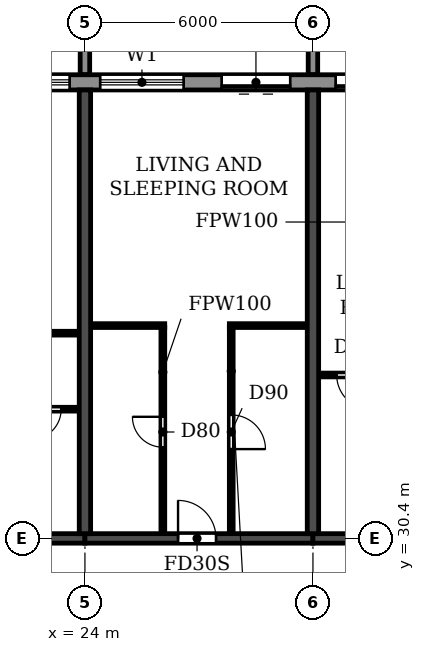
"""IFC4 building model, lengths in metres.
Left out: names, types, materials, properties, quantities, classifications, styles, units other than length and angle.
Written with IfcOpenShell. Run it as: python <this file> out.ifc"""

import sys

from ifc_helpers import new_model, si_unit, direction, frame, frame_2d, origin, place, context, subcontext, project, spatial, polyline, rectangle, outline, extrude, source, transform, mapped, element, fill, save


model = new_model("IFC4")
c1 = context("Model", 3, precision=1e-05, world=origin(), true_north=direction((0.0, 1.0)))
c2 = subcontext(c1, "Body", "Model", "MODEL_VIEW")
j1 = project(units=[si_unit("LENGTHUNIT", "METRE"), si_unit("PLANEANGLEUNIT", "RADIAN")], contexts=[c1])
p1 = place(None, origin())
s1 = spatial("IfcSite", under=j1, at=p1, CompositionType="ELEMENT")
p2 = place(p1, origin())
s2 = spatial("IfcBuilding", under=s1, at=p2, CompositionType="ELEMENT")
p3 = place(p2, frame((0.0, 0.0, 155.4)))
s3 = spatial("IfcBuildingStorey", under=s2, at=p3, CompositionType="ELEMENT", Elevation=155.4)
for number, where, z_axis, x_axis in (
    (1, (24.0, 30.525, 0.0), (0.0, 0.0, 1.0), (0.0, 1.0, 0.0)),
    (2, (30.0, 30.525, 0.0), (0.0, 0.0, 1.0), (0.0, 1.0, 0.0)),
):
    element("IfcWall", number, at=place(p3, frame(where, z_axis=z_axis, x_axis=x_axis)), inside=s3, PredefinedType="SHEAR", context=c2, shape_type="SweptSolid", body=[
        extrude(rectangle(XDim=11.675, YDim=0.3, at=frame_2d((5.837, 0.0))), origin(), (0.0, 0.0, 1.0), 3.0),
    ])
p4 = place(p3, frame((18.0, 30.4, 0.0), z_axis=(0.0, 0.0, 1.0), x_axis=(1.0, 0.0, 0.0)))
e3 = element("IfcWall", 3, at=p4, inside=s3, PredefinedType="SHEAR", context=c2, shape_type="SweptSolid", body=[
    extrude(rectangle(XDim=6.0, YDim=0.25, at=frame_2d((3.0, 0.0))), origin(), (0.0, 0.0, 1.0), 2.4),
])
p5 = place(p4, frame((2.55, 0.0, 0.0)))
e4 = element("IfcOpeningElement", 4, at=p5, cuts=e3, PredefinedType="OPENING", context=c2, shape_type="SweptSolid", body=[
    extrude(rectangle(XDim=1.0, YDim=2.1, at=frame_2d((0.5, 1.05))), frame((0.0, 0.135, 0.0), z_axis=(0.0, -1.0, 0.0), x_axis=(1.0, 0.0, 0.0)), (0.0, 0.0, 1.0), 0.27),
])
p6 = place(p3, frame((24.0, 30.4, 0.0), z_axis=(0.0, 0.0, 1.0), x_axis=(1.0, 0.0, 0.0)))
e5 = element("IfcWall", 5, at=p6, inside=s3, PredefinedType="SHEAR", context=c2, shape_type="SweptSolid", body=[
    extrude(rectangle(XDim=6.0, YDim=0.25, at=frame_2d((3.0, 0.0))), origin(), (0.0, 0.0, 1.0), 2.4),
])
p7 = place(p6, frame((2.45, 0.0, 0.0)))
e6 = element("IfcOpeningElement", 6, at=p7, cuts=e5, PredefinedType="OPENING", context=c2, shape_type="SweptSolid", body=[
    extrude(rectangle(XDim=1.0, YDim=2.1, at=frame_2d((0.5, 1.05))), frame((0.0, 0.135, 0.0), z_axis=(0.0, -1.0, 0.0), x_axis=(1.0, 0.0, 0.0)), (0.0, 0.0, 1.0), 0.27),
])
p8 = place(p3, frame((30.0, 30.4, 0.0), z_axis=(0.0, 0.0, 1.0), x_axis=(1.0, 0.0, 0.0)))
e7 = element("IfcWall", 7, at=p8, inside=s3, PredefinedType="SHEAR", context=c2, shape_type="SweptSolid", body=[
    extrude(rectangle(XDim=6.0, YDim=0.25, at=frame_2d((3.0, 0.0))), origin(), (0.0, 0.0, 1.0), 2.4),
])
p9 = place(p8, frame((2.55, 0.0, 0.0)))
e8 = element("IfcOpeningElement", 8, at=p9, cuts=e7, PredefinedType="OPENING", context=c2, shape_type="SweptSolid", body=[
    extrude(rectangle(XDim=1.0, YDim=2.1, at=frame_2d((0.5, 1.05))), frame((0.0, 0.135, 0.0), z_axis=(0.0, -1.0, 0.0), x_axis=(1.0, 0.0, 0.0)), (0.0, 0.0, 1.0), 0.27),
])
p10 = place(p3, frame((85.317, 42.4, 0.0), z_axis=(0.0, 0.0, 1.0), x_axis=(-1.0, 0.0, 0.0)))
e9 = element("IfcWall", 9, at=p10, inside=s3, PredefinedType="STANDARD", context=c2, shape_type="SweptSolid", body=[
    extrude(rectangle(XDim=68.634, YDim=0.4, at=frame_2d((34.317, 0.0))), origin(), (0.0, 0.0, 1.0), 3.0),
])
p11 = place(p10, frame((64.917, 0.0, 0.0)))
e10 = element("IfcOpeningElement", 10, at=p11, cuts=e9, PredefinedType="OPENING", context=c2, shape_type="SweptSolid", body=[
    extrude(rectangle(XDim=1.8, YDim=2.4, at=frame_2d((0.9, 1.2))), frame((0.0, 0.21, 0.0), z_axis=(0.0, -1.0, 0.0), x_axis=(1.0, 0.0, 0.0)), (0.0, 0.0, 1.0), 0.42),
])
p12 = place(p10, frame((61.717, 0.0, 0.9)))
e11 = element("IfcOpeningElement", 11, at=p12, cuts=e9, PredefinedType="OPENING", context=c2, shape_type="SweptSolid", body=[
    extrude(rectangle(XDim=2.2, YDim=1.5, at=frame_2d((1.1, 0.75))), frame((0.0, 0.21, 0.0), z_axis=(0.0, -1.0, 0.0), x_axis=(1.0, 0.0, 0.0)), (0.0, 0.0, 1.0), 0.42),
])
p13 = place(p10, frame((58.717, 0.0, 0.9)))
e12 = element("IfcOpeningElement", 12, at=p13, cuts=e9, PredefinedType="OPENING", context=c2, shape_type="SweptSolid", body=[
    extrude(rectangle(XDim=2.2, YDim=1.5, at=frame_2d((1.1, 0.75))), frame((0.0, 0.21, 0.0), z_axis=(0.0, -1.0, 0.0), x_axis=(1.0, 0.0, 0.0)), (0.0, 0.0, 1.0), 0.42),
])
p14 = place(p10, frame((55.917, 0.0, 0.0)))
e13 = element("IfcOpeningElement", 13, at=p14, cuts=e9, PredefinedType="OPENING", context=c2, shape_type="SweptSolid", body=[
    extrude(rectangle(XDim=1.8, YDim=2.4, at=frame_2d((0.9, 1.2))), frame((0.0, 0.21, 0.0), z_axis=(0.0, -1.0, 0.0), x_axis=(1.0, 0.0, 0.0)), (0.0, 0.0, 1.0), 0.42),
])
p15 = place(p10, frame((52.917, 0.0, 0.0)))
e14 = element("IfcOpeningElement", 14, at=p15, cuts=e9, PredefinedType="OPENING", context=c2, shape_type="SweptSolid", body=[
    extrude(rectangle(XDim=1.8, YDim=2.4, at=frame_2d((0.9, 1.2))), frame((0.0, 0.21, 0.0), z_axis=(0.0, -1.0, 0.0), x_axis=(1.0, 0.0, 0.0)), (0.0, 0.0, 1.0), 0.42),
])
p16 = place(p10, frame((49.717, 0.0, 0.9)))
e15 = element("IfcOpeningElement", 15, at=p16, cuts=e9, PredefinedType="OPENING", context=c2, shape_type="SweptSolid", body=[
    extrude(rectangle(XDim=2.2, YDim=1.5, at=frame_2d((1.1, 0.75))), frame((0.0, 0.21, 0.0), z_axis=(0.0, -1.0, 0.0), x_axis=(1.0, 0.0, 0.0)), (0.0, 0.0, 1.0), 0.42),
])
p17 = place(p10, frame((46.717, 0.0, 0.9)))
e16 = element("IfcOpeningElement", 16, at=p17, cuts=e9, PredefinedType="OPENING", context=c2, shape_type="SweptSolid", body=[
    extrude(rectangle(XDim=2.2, YDim=1.5, at=frame_2d((1.1, 0.75))), frame((0.0, 0.21, 0.0), z_axis=(0.0, -1.0, 0.0), x_axis=(1.0, 0.0, 0.0)), (0.0, 0.0, 1.0), 0.42),
])
p18 = place(p10, frame((43.717, 0.0, 0.9)))
e17 = element("IfcOpeningElement", 17, at=p18, cuts=e9, PredefinedType="OPENING", context=c2, shape_type="SweptSolid", body=[
    extrude(rectangle(XDim=2.2, YDim=1.5, at=frame_2d((1.1, 0.75))), frame((0.0, 0.21, 0.0), z_axis=(0.0, -1.0, 0.0), x_axis=(1.0, 0.0, 0.0)), (0.0, 0.0, 1.0), 0.42),
])
p19 = place(p10, frame((40.917, 0.0, 0.0)))
e18 = element("IfcOpeningElement", 18, at=p19, cuts=e9, PredefinedType="OPENING", context=c2, shape_type="SweptSolid", body=[
    extrude(rectangle(XDim=1.8, YDim=2.4, at=frame_2d((0.9, 1.2))), frame((0.0, 0.21, 0.0), z_axis=(0.0, -1.0, 0.0), x_axis=(1.0, 0.0, 0.0)), (0.0, 0.0, 1.0), 0.42),
])
p20 = place(p10, frame((37.717, 0.0, 0.9)))
e19 = element("IfcOpeningElement", 19, at=p20, cuts=e9, PredefinedType="OPENING", context=c2, shape_type="SweptSolid", body=[
    extrude(rectangle(XDim=2.2, YDim=1.5, at=frame_2d((1.1, 0.75))), frame((0.0, 0.21, 0.0), z_axis=(0.0, -1.0, 0.0), x_axis=(1.0, 0.0, 0.0)), (0.0, 0.0, 1.0), 0.42),
])
p21 = place(p10, frame((34.917, 0.0, 0.0)))
e20 = element("IfcOpeningElement", 20, at=p21, cuts=e9, PredefinedType="OPENING", context=c2, shape_type="SweptSolid", body=[
    extrude(rectangle(XDim=1.8, YDim=2.4, at=frame_2d((0.9, 1.2))), frame((0.0, 0.21, 0.0), z_axis=(0.0, -1.0, 0.0), x_axis=(1.0, 0.0, 0.0)), (0.0, 0.0, 1.0), 0.42),
])
p22 = place(p10, frame((31.717, 0.0, 0.9)))
e21 = element("IfcOpeningElement", 21, at=p22, cuts=e9, PredefinedType="OPENING", context=c2, shape_type="SweptSolid", body=[
    extrude(rectangle(XDim=2.2, YDim=1.5, at=frame_2d((1.1, 0.75))), frame((0.0, 0.21, 0.0), z_axis=(0.0, -1.0, 0.0), x_axis=(1.0, 0.0, 0.0)), (0.0, 0.0, 1.0), 0.42),
])
p23 = place(p10, frame((28.717, 0.0, 0.9)))
e22 = element("IfcOpeningElement", 22, at=p23, cuts=e9, PredefinedType="OPENING", context=c2, shape_type="SweptSolid", body=[
    extrude(rectangle(XDim=2.2, YDim=1.5, at=frame_2d((1.1, 0.75))), frame((0.0, 0.21, 0.0), z_axis=(0.0, -1.0, 0.0), x_axis=(1.0, 0.0, 0.0)), (0.0, 0.0, 1.0), 0.42),
])
p24 = place(p10, frame((25.717, 0.0, 0.9)))
e23 = element("IfcOpeningElement", 23, at=p24, cuts=e9, PredefinedType="OPENING", context=c2, shape_type="SweptSolid", body=[
    extrude(rectangle(XDim=2.2, YDim=1.5, at=frame_2d((1.1, 0.75))), frame((0.0, 0.21, 0.0), z_axis=(0.0, -1.0, 0.0), x_axis=(1.0, 0.0, 0.0)), (0.0, 0.0, 1.0), 0.42),
])
p25 = place(p10, frame((22.717, 0.0, 0.9)))
e24 = element("IfcOpeningElement", 24, at=p25, cuts=e9, PredefinedType="OPENING", context=c2, shape_type="SweptSolid", body=[
    extrude(rectangle(XDim=2.2, YDim=1.5, at=frame_2d((1.1, 0.75))), frame((0.0, 0.21, 0.0), z_axis=(0.0, -1.0, 0.0), x_axis=(1.0, 0.0, 0.0)), (0.0, 0.0, 1.0), 0.42),
])
p26 = place(p10, frame((19.917, 0.0, 0.0)))
e25 = element("IfcOpeningElement", 25, at=p26, cuts=e9, PredefinedType="OPENING", context=c2, shape_type="SweptSolid", body=[
    extrude(rectangle(XDim=1.8, YDim=2.4, at=frame_2d((0.9, 1.2))), frame((0.0, 0.21, 0.0), z_axis=(0.0, -1.0, 0.0), x_axis=(1.0, 0.0, 0.0)), (0.0, 0.0, 1.0), 0.42),
])
p27 = place(p10, frame((16.717, 0.0, 0.9)))
e26 = element("IfcOpeningElement", 26, at=p27, cuts=e9, PredefinedType="OPENING", context=c2, shape_type="SweptSolid", body=[
    extrude(rectangle(XDim=2.2, YDim=1.5, at=frame_2d((1.1, 0.75))), frame((0.0, 0.21, 0.0), z_axis=(0.0, -1.0, 0.0), x_axis=(1.0, 0.0, 0.0)), (0.0, 0.0, 1.0), 0.42),
])
p28 = place(p10, frame((13.717, 0.0, 0.9)))
e27 = element("IfcOpeningElement", 27, at=p28, cuts=e9, PredefinedType="OPENING", context=c2, shape_type="SweptSolid", body=[
    extrude(rectangle(XDim=2.2, YDim=1.5, at=frame_2d((1.1, 0.75))), frame((0.0, 0.21, 0.0), z_axis=(0.0, -1.0, 0.0), x_axis=(1.0, 0.0, 0.0)), (0.0, 0.0, 1.0), 0.42),
])
p29 = place(p10, frame((10.917, 0.0, 0.0)))
e28 = element("IfcOpeningElement", 28, at=p29, cuts=e9, PredefinedType="OPENING", context=c2, shape_type="SweptSolid", body=[
    extrude(rectangle(XDim=1.8, YDim=2.4, at=frame_2d((0.9, 1.2))), frame((0.0, 0.21, 0.0), z_axis=(0.0, -1.0, 0.0), x_axis=(1.0, 0.0, 0.0)), (0.0, 0.0, 1.0), 0.42),
])
p30 = place(p10, frame((7.717, 0.0, 0.9)))
e29 = element("IfcOpeningElement", 29, at=p30, cuts=e9, PredefinedType="OPENING", context=c2, shape_type="SweptSolid", body=[
    extrude(rectangle(XDim=2.2, YDim=1.5, at=frame_2d((1.1, 0.75))), frame((0.0, 0.21, 0.0), z_axis=(0.0, -1.0, 0.0), x_axis=(1.0, 0.0, 0.0)), (0.0, 0.0, 1.0), 0.42),
])
p31 = place(p10, frame((4.717, 0.0, 0.9)))
e30 = element("IfcOpeningElement", 30, at=p31, cuts=e9, PredefinedType="OPENING", context=c2, shape_type="SweptSolid", body=[
    extrude(rectangle(XDim=2.2, YDim=1.5, at=frame_2d((1.1, 0.75))), frame((0.0, 0.21, 0.0), z_axis=(0.0, -1.0, 0.0), x_axis=(1.0, 0.0, 0.0)), (0.0, 0.0, 1.0), 0.42),
])
p32 = place(p10, frame((1.917, 0.0, 0.0)))
e31 = element("IfcOpeningElement", 31, at=p32, cuts=e9, PredefinedType="OPENING", context=c2, shape_type="SweptSolid", body=[
    extrude(rectangle(XDim=1.8, YDim=2.4, at=frame_2d((0.9, 1.2))), frame((0.0, 0.21, 0.0), z_axis=(0.0, -1.0, 0.0), x_axis=(1.0, 0.0, 0.0)), (0.0, 0.0, 1.0), 0.42),
])
m1 = source(origin(), c2, "Body", "SweptSolid", [
    extrude(outline(polyline([(0.0, 0.0), (0.25, 0.0), (0.25, 3.1), (0.0, 3.1), (0.0, 0.0)])), origin(), (0.0, 0.0, 1.0), 3.1),
])
for number, where in (
    (32, (23.875, 42.6, 0.0)),
    (33, (29.875, 42.6, 0.0)),
):
    element("IfcWall", number, at=place(p3, frame(where)), inside=s3, PredefinedType="STANDARD", context=c2, shape_type="MappedRepresentation", body=[
        mapped(m1, transform((0.0, 0.0, 0.0))),
    ])
p33 = place(p3, frame((21.9, 33.8, 0.0), z_axis=(0.0, 0.0, 1.0), x_axis=(1.0, 0.0, 0.0)))
e34 = element("IfcWall", 34, at=p33, inside=s3, PredefinedType="PARTITIONING", context=c2, shape_type="SweptSolid", body=[
    extrude(rectangle(XDim=1.94, YDim=0.1, at=frame_2d((0.97, 0.0))), origin(), (0.0, 0.0, 1.0), 3.0),
])
p34 = place(p33, frame((0.675, 0.0, 0.0)))
e35 = element("IfcOpeningElement", 35, at=p34, cuts=e34, PredefinedType="OPENING", context=c2, shape_type="SweptSolid", body=[
    extrude(rectangle(XDim=0.8, YDim=2.1, at=frame_2d((0.4, 1.05))), frame((0.0, 0.06, 0.0), z_axis=(0.0, -1.0, 0.0), x_axis=(1.0, 0.0, 0.0)), (0.0, 0.0, 1.0), 0.12),
])
p35 = place(p3, frame((30.16, 34.7, 0.0), z_axis=(0.0, 0.0, 1.0), x_axis=(1.0, 0.0, 0.0)))
e36 = element("IfcWall", 36, at=p35, inside=s3, PredefinedType="PARTITIONING", context=c2, shape_type="SweptSolid", body=[
    extrude(rectangle(XDim=2.04, YDim=0.1, at=frame_2d((1.02, 0.0))), origin(), (0.0, 0.0, 1.0), 3.0),
])
p36 = place(p35, frame((0.465, 0.0, 0.0)))
e37 = element("IfcOpeningElement", 37, at=p36, cuts=e36, PredefinedType="OPENING", context=c2, shape_type="SweptSolid", body=[
    extrude(rectangle(XDim=0.9, YDim=2.1, at=frame_2d((0.45, 1.05))), frame((0.0, 0.06, 0.0), z_axis=(0.0, -1.0, 0.0), x_axis=(1.0, 0.0, 0.0)), (0.0, 0.0, 1.0), 0.12),
])
p37 = place(p3, frame((20.95, 35.8, 0.0), z_axis=(0.0, 0.0, 1.0), x_axis=(1.0, 0.0, 0.0)))
e38 = element("IfcWall", 38, at=p37, inside=s3, PredefinedType="PARTITIONING", context=c2, shape_type="SweptSolid", body=[
    extrude(rectangle(XDim=2.89, YDim=0.1, at=frame_2d((1.445, 0.0))), origin(), (0.0, 0.0, 1.0), 3.0),
])
p38 = place(p37, frame((0.55, 0.0, 0.0)))
e39 = element("IfcOpeningElement", 39, at=p38, cuts=e38, PredefinedType="OPENING", context=c2, shape_type="SweptSolid", body=[
    extrude(rectangle(XDim=0.9, YDim=2.1, at=frame_2d((0.45, 1.05))), frame((0.0, 0.06, 0.0), z_axis=(0.0, -1.0, 0.0), x_axis=(1.0, 0.0, 0.0)), (0.0, 0.0, 1.0), 0.12),
])
p39 = place(p3, frame((24.16, 36.0, 0.0), z_axis=(0.0, 0.0, 1.0), x_axis=(1.0, 0.0, 0.0)))
e40 = element("IfcWall", 40, at=p39, inside=s3, PredefinedType="PARTITIONING", context=c2, shape_type="SweptSolid", body=[
    extrude(rectangle(XDim=1.94, YDim=0.1, at=frame_2d((0.97, 0.0))), origin(), (0.0, 0.0, 1.0), 3.0),
])
p40 = place(p3, frame((27.8, 36.0, 0.0), z_axis=(0.0, 0.0, 1.0), x_axis=(1.0, 0.0, 0.0)))
e41 = element("IfcWall", 41, at=p40, inside=s3, PredefinedType="PARTITIONING", context=c2, shape_type="SweptSolid", body=[
    extrude(rectangle(XDim=2.04, YDim=0.1, at=frame_2d((1.02, 0.0))), origin(), (0.0, 0.0, 1.0), 3.0),
])
p41 = place(p3, frame((26.05, 30.535, 0.0), z_axis=(0.0, 0.0, 1.0), x_axis=(0.0, 1.0, 0.0)))
e42 = element("IfcWall", 42, at=p41, inside=s3, PredefinedType="PARTITIONING", context=c2, shape_type="SweptSolid", body=[
    extrude(rectangle(XDim=5.415, YDim=0.1, at=frame_2d((2.708, 0.0))), origin(), (0.0, 0.0, 1.0), 3.0),
])
p42 = place(p41, frame((2.265, 0.0, 0.0)))
e43 = element("IfcOpeningElement", 43, at=p42, cuts=e42, PredefinedType="OPENING", context=c2, shape_type="SweptSolid", body=[
    extrude(rectangle(XDim=0.8, YDim=2.1, at=frame_2d((0.4, 1.05))), frame((0.0, 0.06, 0.0), z_axis=(0.0, -1.0, 0.0), x_axis=(1.0, 0.0, 0.0)), (0.0, 0.0, 1.0), 0.12),
])
p43 = place(p3, frame((27.85, 30.535, 0.0), z_axis=(0.0, 0.0, 1.0), x_axis=(0.0, 1.0, 0.0)))
e44 = element("IfcWall", 44, at=p43, inside=s3, PredefinedType="PARTITIONING", context=c2, shape_type="SweptSolid", body=[
    extrude(rectangle(XDim=5.415, YDim=0.1, at=frame_2d((2.708, 0.0))), origin(), (0.0, 0.0, 1.0), 3.0),
])
p44 = place(p43, frame((2.215, 0.0, 0.0)))
e45 = element("IfcOpeningElement", 45, at=p44, cuts=e44, PredefinedType="OPENING", context=c2, shape_type="SweptSolid", body=[
    extrude(rectangle(XDim=0.9, YDim=2.1, at=frame_2d((0.45, 1.05))), frame((0.0, 0.06, 0.0), z_axis=(0.0, -1.0, 0.0), x_axis=(1.0, 0.0, 0.0)), (0.0, 0.0, 1.0), 0.12),
])
p45 = place(p12, origin())
e46 = element("IfcWindow", 46, at=p45, inside=s3, PartitioningType="DOUBLE_PANEL_HORIZONTAL", PredefinedType="WINDOW", context=c2, shape_type="SweptSolid", body=[
    extrude(rectangle(XDim=2.2, YDim=1.5, at=frame_2d((1.1, 0.75))), frame((0.0, 0.03, 0.0), z_axis=(0.0, -1.0, 0.0), x_axis=(1.0, 0.0, 0.0)), (0.0, 0.0, 1.0), 0.06),
])
fill(e11, e46)
p46 = place(p13, origin())
e47 = element("IfcWindow", 47, at=p46, inside=s3, PartitioningType="DOUBLE_PANEL_HORIZONTAL", PredefinedType="WINDOW", context=c2, shape_type="SweptSolid", body=[
    extrude(rectangle(XDim=2.2, YDim=1.5, at=frame_2d((1.1, 0.75))), frame((0.0, 0.03, 0.0), z_axis=(0.0, -1.0, 0.0), x_axis=(1.0, 0.0, 0.0)), (0.0, 0.0, 1.0), 0.06),
])
fill(e12, e47)
p47 = place(p14, origin())
e48 = element("IfcDoor", 48, at=p47, inside=s3, OperationType="DOUBLE_DOOR_SLIDING", PredefinedType="DOOR", context=c2, shape_type="SweptSolid", body=[
    extrude(rectangle(XDim=1.8, YDim=2.4, at=frame_2d((0.9, 1.2))), frame((0.0, 0.025, 0.0), z_axis=(0.0, -1.0, 0.0), x_axis=(1.0, 0.0, 0.0)), (0.0, 0.0, 1.0), 0.05),
])
fill(e13, e48)
p48 = place(p15, origin())
e49 = element("IfcDoor", 49, at=p48, inside=s3, OperationType="DOUBLE_DOOR_SLIDING", PredefinedType="DOOR", context=c2, shape_type="SweptSolid", body=[
    extrude(rectangle(XDim=1.8, YDim=2.4, at=frame_2d((0.9, 1.2))), frame((0.0, 0.025, 0.0), z_axis=(0.0, -1.0, 0.0), x_axis=(1.0, 0.0, 0.0)), (0.0, 0.0, 1.0), 0.05),
])
fill(e14, e49)
p49 = place(p34, frame((0.8, 0.0, 0.0), z_axis=(0.0, 0.0, 1.0), x_axis=(-1.0, 0.0, 0.0)))
e50 = element("IfcDoor", 50, at=p49, inside=s3, OperationType="SINGLE_SWING_RIGHT", PredefinedType="DOOR", context=c2, shape_type="SweptSolid", body=[
    extrude(rectangle(XDim=0.8, YDim=2.1, at=frame_2d((0.4, 1.05))), frame((0.0, 0.025, 0.0), z_axis=(0.0, -1.0, 0.0), x_axis=(1.0, 0.0, 0.0)), (0.0, 0.0, 1.0), 0.05),
])
fill(e35, e50)
p50 = place(p42, origin())
e51 = element("IfcDoor", 51, at=p50, inside=s3, OperationType="SINGLE_SWING_RIGHT", PredefinedType="DOOR", context=c2, shape_type="SweptSolid", body=[
    extrude(rectangle(XDim=0.8, YDim=2.1, at=frame_2d((0.4, 1.05))), frame((0.0, 0.025, 0.0), z_axis=(0.0, -1.0, 0.0), x_axis=(1.0, 0.0, 0.0)), (0.0, 0.0, 1.0), 0.05),
])
fill(e43, e51)
p51 = place(p7, origin())
e52 = element("IfcDoor", 52, at=p51, inside=s3, OperationType="SINGLE_SWING_LEFT", PredefinedType="DOOR", context=c2, shape_type="SweptSolid", body=[
    extrude(rectangle(XDim=1.0, YDim=2.1, at=frame_2d((0.5, 1.05))), frame((0.0, 0.025, 0.0), z_axis=(0.0, -1.0, 0.0), x_axis=(1.0, 0.0, 0.0)), (0.0, 0.0, 1.0), 0.05),
])
fill(e6, e52)
p52 = place(p44, frame((0.9, 0.0, 0.0), z_axis=(0.0, 0.0, 1.0), x_axis=(-1.0, 0.0, 0.0)))
e53 = element("IfcDoor", 53, at=p52, inside=s3, OperationType="SINGLE_SWING_RIGHT", PredefinedType="DOOR", context=c2, shape_type="SweptSolid", body=[
    extrude(rectangle(XDim=0.9, YDim=2.1, at=frame_2d((0.45, 1.05))), frame((0.0, 0.025, 0.0), z_axis=(0.0, -1.0, 0.0), x_axis=(1.0, 0.0, 0.0)), (0.0, 0.0, 1.0), 0.05),
])
fill(e45, e53)
p53 = place(p36, frame((0.9, 0.0, 0.0), z_axis=(0.0, 0.0, 1.0), x_axis=(-1.0, 0.0, 0.0)))
e54 = element("IfcDoor", 54, at=p53, inside=s3, OperationType="SINGLE_SWING_LEFT", PredefinedType="DOOR", context=c2, shape_type="SweptSolid", body=[
    extrude(rectangle(XDim=0.9, YDim=2.1, at=frame_2d((0.45, 1.05))), frame((0.0, 0.025, 0.0), z_axis=(0.0, -1.0, 0.0), x_axis=(1.0, 0.0, 0.0)), (0.0, 0.0, 1.0), 0.05),
])
fill(e37, e54)
save(model, sys.argv[1])
